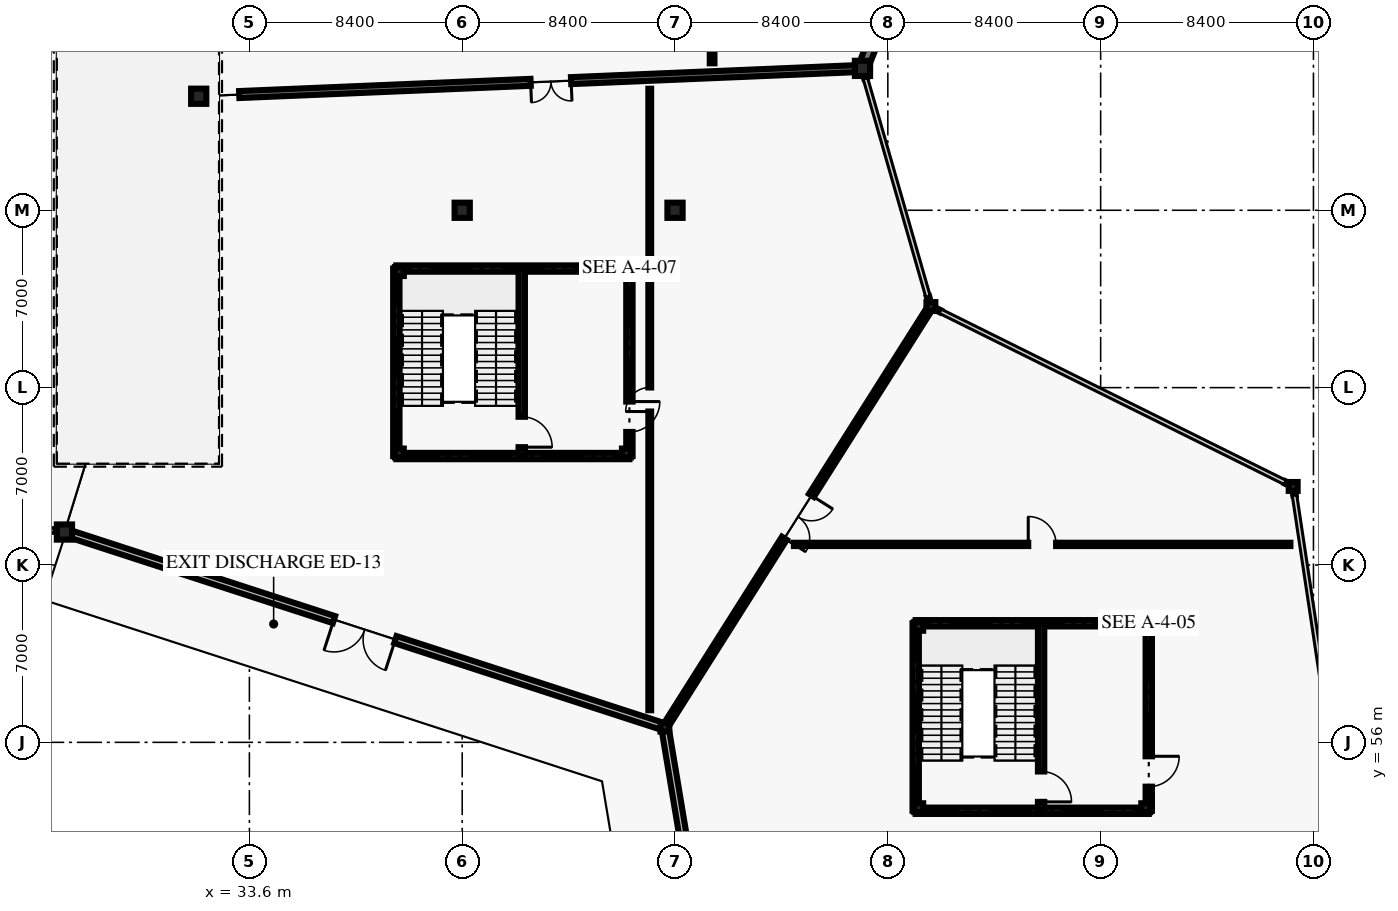
"""IFC4 building model, lengths in metres.
Left out: names, types, materials, properties, quantities, classifications, styles, units other than length and angle.
Written with IfcOpenShell. Run it as: python <this file> out.ifc"""

import sys

from ifc_helpers import new_model, si_unit, direction, frame, frame_2d, origin, origin_2d, place, context, subcontext, project, spatial, rectangle, i_section, extrude, element, fill, save


model = new_model("IFC4")
c1 = context("Model", 3, precision=1e-05, world=origin(), true_north=direction((0.0, 1.0)))
c2 = subcontext(c1, "Body", "Model", "MODEL_VIEW")
j1 = project(units=[si_unit("LENGTHUNIT", "METRE"), si_unit("PLANEANGLEUNIT", "RADIAN")], contexts=[c1])
p1 = place(None, origin())
s1 = spatial("IfcSite", under=j1, at=p1, CompositionType="ELEMENT")
p2 = place(p1, origin())
s2 = spatial("IfcBuilding", under=s1, at=p2, CompositionType="ELEMENT")
p3 = place(p2, origin())
s3 = spatial("IfcBuildingStorey", under=s2, at=p3, CompositionType="ELEMENT", Elevation=0.0)
for number, where, z_axis, x_axis in (
    (1, (26.3, 64.3, 0.0), (0.0, 0.0, 1.0), (1.0, 0.0, 0.0)),
    (2, (31.6, 81.5, 0.0), (0.0, 0.0, 1.0), (1.0, 0.0, 0.0)),
):
    element("IfcColumn", number, at=place(p3, frame(where, z_axis=z_axis, x_axis=x_axis)), inside=s3, PredefinedType="COLUMN", context=c2, shape_type="SweptSolid", body=[
        extrude(rectangle(XDim=0.6, YDim=0.6, at=origin_2d()), origin(), (0.0, 0.0, 1.0), 5.4),
    ])
p4 = place(p3, frame((50.0, 56.6, 0.0), z_axis=(0.0, 0.0, 1.0), x_axis=(1.0, 0.0, 0.0)))
e3 = element("IfcColumn", 3, at=p4, inside=s3, PredefinedType="COLUMN", context=c2, shape_type="SweptSolid", body=[
    extrude(i_section(OverallWidth=0.35, OverallDepth=0.35, WebThickness=0.02, FlangeThickness=0.028, at=origin_2d()), origin(), (0.0, 0.0, 1.0), 5.4),
])
p5 = place(p3, frame((57.8, 82.6, 0.0), z_axis=(0.0, 0.0, 1.0), x_axis=(1.0, 0.0, 0.0)))
e4 = element("IfcColumn", 4, at=p5, inside=s3, PredefinedType="COLUMN", context=c2, shape_type="SweptSolid", body=[
    extrude(rectangle(XDim=0.6, YDim=0.6, at=origin_2d()), origin(), (0.0, 0.0, 1.0), 5.4),
])
for number, where, z_axis, x_axis in (
    (5, (60.5, 73.2, 0.0), (0.0, 0.0, 1.0), (1.0, 0.0, 0.0)),
    (6, (74.8, 66.1, 0.0), (0.0, 0.0, 1.0), (1.0, 0.0, 0.0)),
):
    element("IfcColumn", number, at=place(p3, frame(where, z_axis=z_axis, x_axis=x_axis)), inside=s3, PredefinedType="COLUMN", context=c2, shape_type="SweptSolid", body=[
        extrude(i_section(OverallWidth=0.35, OverallDepth=0.35, WebThickness=0.02, FlangeThickness=0.028, at=origin_2d()), origin(), (0.0, 0.0, 1.0), 5.4),
    ])
for number, where, z_axis, x_axis in (
    (7, (42.0, 77.0, 0.0), (0.0, 0.0, 1.0), (1.0, 0.0, 0.0)),
    (8, (50.4, 77.0, 0.0), (0.0, 0.0, 1.0), (1.0, 0.0, 0.0)),
):
    element("IfcColumn", number, at=place(p3, frame(where, z_axis=z_axis, x_axis=x_axis)), inside=s3, PredefinedType="COLUMN", context=c2, shape_type="SweptSolid", body=[
        extrude(rectangle(XDim=0.6, YDim=0.6, at=origin_2d()), origin(), (0.0, 0.0, 1.0), 5.4),
    ])
for number, where, z_axis, x_axis in (
    (9, (60.02, 53.42, 0.0), (0.0, 0.0, 1.0), (1.0, 0.0, 0.0)),
    (10, (68.98, 53.42, 0.0), (0.0, 0.0, 1.0), (1.0, 0.0, 0.0)),
    (11, (68.98, 60.58, 0.0), (0.0, 0.0, 1.0), (1.0, 0.0, 0.0)),
    (12, (60.02, 60.58, 0.0), (0.0, 0.0, 1.0), (1.0, 0.0, 0.0)),
    (13, (39.52, 67.42, 0.0), (0.0, 0.0, 1.0), (1.0, 0.0, 0.0)),
    (14, (48.48, 67.42, 0.0), (0.0, 0.0, 1.0), (1.0, 0.0, 0.0)),
    (15, (48.48, 74.58, 0.0), (0.0, 0.0, 1.0), (1.0, 0.0, 0.0)),
    (16, (39.52, 74.58, 0.0), (0.0, 0.0, 1.0), (1.0, 0.0, 0.0)),
):
    element("IfcColumn", number, at=place(p3, frame(where, z_axis=z_axis, x_axis=x_axis)), inside=s3, PredefinedType="COLUMN", context=c2, shape_type="SweptSolid", body=[
        extrude(i_section(OverallWidth=0.35, OverallDepth=0.35, WebThickness=0.02, FlangeThickness=0.028, at=origin_2d()), origin(), (0.0, 0.0, 1.0), 5.4),
    ])
p6 = place(p3, frame((51.99, 44.659, 0.0), z_axis=(0.0, 0.0, 1.0), x_axis=(-0.16436940764, 0.986398853321, 0.0)))
e17 = element("IfcWall", 17, at=p6, inside=s3, PredefinedType="SOLIDWALL", context=c2, shape_type="SweptSolid", body=[
    extrude(rectangle(XDim=12.046, YDim=0.29, at=frame_2d((6.023, 0.0))), origin(), (0.0, 0.0, 1.0), 4.22),
])
p7 = place(p6, frame((4.748, 0.0, 0.0)))
e18 = element("IfcOpeningElement", 18, at=p7, cuts=e17, PredefinedType="OPENING", context=c2, shape_type="SweptSolid", body=[
    extrude(rectangle(XDim=2.55, YDim=2.5, at=frame_2d((1.275, 1.25))), frame((0.0, 0.155, 0.0), z_axis=(0.0, -1.0, 0.0), x_axis=(1.0, 0.0, 0.0)), (0.0, 0.0, 1.0), 0.31),
])
p8 = place(p3, frame((74.806, 66.058, 0.0), z_axis=(0.0, 0.0, 1.0), x_axis=(0.14996991646, -0.988690560366, 0.0)))
e19 = element("IfcWall", 19, at=p8, inside=s3, PredefinedType="SOLIDWALL", context=c2, shape_type="SweptSolid", body=[
    extrude(rectangle(XDim=0.308, YDim=0.095, at=frame_2d((0.154, 0.0))), origin(), (0.0, 0.0, 1.0), 4.22),
])
for number, where, z_axis, x_axis in (
    (20, (60.592, 73.154, 0.0), (0.0, 0.0, 1.0), (0.895, -0.446, 0.0)),
    (21, (74.487, 66.256, 0.0), (0.0, 0.0, 1.0), (0.895, -0.447, 0.0)),
):
    element("IfcWall", number, at=place(p3, frame(where, z_axis=z_axis, x_axis=x_axis)), inside=s3, PredefinedType="SOLIDWALL", context=c2, shape_type="SweptSolid", body=[
        extrude(rectangle(XDim=0.307, YDim=0.095, at=frame_2d((0.154, 0.0))), origin(), (0.0, 0.0, 1.0), 4.22),
    ])
for number, where, z_axis, x_axis in (
    (22, (57.829, 82.502, 0.0), (0.0, 0.0, 1.0), (0.276, -0.961, 0.0)),
    (23, (60.386, 73.594, 0.0), (0.0, 0.0, 1.0), (0.276, -0.961, 0.0)),
):
    element("IfcWall", number, at=place(p3, frame(where, z_axis=z_axis, x_axis=x_axis)), inside=s3, PredefinedType="SOLIDWALL", context=c2, shape_type="SweptSolid", body=[
        extrude(rectangle(XDim=0.308, YDim=0.095, at=frame_2d((0.154, 0.0))), origin(), (0.0, 0.0, 1.0), 4.22),
    ])
p9 = place(p3, frame((49.943, 56.619, 0.0), z_axis=(0.0, 0.0, 1.0), x_axis=(-0.951074357174, 0.308962080402, 0.0)))
e24 = element("IfcWall", 24, at=p9, inside=s3, PredefinedType="SOLIDWALL", context=c2, shape_type="SweptSolid", body=[
    extrude(rectangle(XDim=24.8, YDim=0.29, at=frame_2d((12.4, 0.0))), origin(), (0.0, 0.0, 1.0), 4.22),
])
p10 = place(p9, frame((11.124, 0.0, 0.0)))
e25 = element("IfcOpeningElement", 25, at=p10, cuts=e24, PredefinedType="OPENING", context=c2, shape_type="SweptSolid", body=[
    extrude(rectangle(XDim=2.55, YDim=2.5, at=frame_2d((1.275, 1.25))), frame((0.0, 0.155, 0.0), z_axis=(0.0, -1.0, 0.0), x_axis=(1.0, 0.0, 0.0)), (0.0, 0.0, 1.0), 0.31),
])
p11 = place(p3, frame((62.4, 94.1, 0.0), z_axis=(0.0, 0.0, 1.0), x_axis=(-0.371407751599, -0.928469860605, 0.0)))
e26 = element("IfcWall", 26, at=p11, inside=s3, PredefinedType="SOLIDWALL", context=c2, shape_type="SweptSolid", body=[
    extrude(rectangle(XDim=12.326, YDim=0.4, at=frame_2d((6.163, 0.0))), origin(), (0.0, 0.0, 1.0), 4.22),
])
p12 = place(p3, frame((26.199, 64.314, 0.0), z_axis=(0.0, 0.0, 1.0), x_axis=(-0.991074779294, 0.133307096014, 0.0)))
e27 = element("IfcWall", 27, at=p12, inside=s3, PredefinedType="SOLIDWALL", context=c2, shape_type="SweptSolid", body=[
    extrude(rectangle(XDim=0.308, YDim=0.095, at=frame_2d((0.154, 0.0))), origin(), (0.0, 0.0, 1.0), 4.22),
])
p13 = place(p3, frame((60.5, 73.2, 0.0), z_axis=(0.0, 0.0, 1.0), x_axis=(-0.534570878454, -0.845123645338, 0.0)))
e28 = element("IfcWall", 28, at=p13, inside=s3, PredefinedType="SOLIDWALL", context=c2, shape_type="SweptSolid", body=[
    extrude(rectangle(XDim=19.642, YDim=0.225, at=frame_2d((9.821, 0.0))), origin(), (0.0, 0.0, 1.0), 4.62),
])
p14 = place(p13, frame((8.821, 0.0, 0.0)))
e29 = element("IfcOpeningElement", 29, at=p14, cuts=e28, PredefinedType="OPENING", context=c2, shape_type="SweptSolid", body=[
    extrude(rectangle(XDim=2.0, YDim=2.5, at=frame_2d((1.0, 1.25))), frame((0.0, 0.123, 0.0), z_axis=(0.0, -1.0, 0.0), x_axis=(1.0, 0.0, 0.0)), (0.0, 0.0, 1.0), 0.245),
])
p15 = place(p3, frame((57.8, 82.6, 0.0), z_axis=(0.0, 0.0, 1.0), x_axis=(-0.999119166836, -0.041962965345, 0.0)))
e30 = element("IfcWall", 30, at=p15, inside=s3, PredefinedType="SOLIDWALL", context=c2, shape_type="SweptSolid", body=[
    extrude(rectangle(XDim=24.622, YDim=0.275, at=frame_2d((12.311, 0.0))), origin(), (0.0, 0.0, 1.0), 4.62),
])
p16 = place(p15, frame((11.511, 0.0, 0.0)))
e31 = element("IfcOpeningElement", 31, at=p16, cuts=e30, PredefinedType="OPENING", context=c2, shape_type="SweptSolid", body=[
    extrude(rectangle(XDim=1.6, YDim=2.45, at=frame_2d((0.8, 1.225))), frame((0.0, 0.147, 0.0), z_axis=(0.0, -1.0, 0.0), x_axis=(1.0, 0.0, 0.0)), (0.0, 0.0, 1.0), 0.295),
])
p17 = place(p3, frame((55.095, 63.813, 0.0), z_axis=(0.0, 0.0, 1.0), x_axis=(1.0, 0.0, 0.0)))
e32 = element("IfcWall", 32, at=p17, inside=s3, PredefinedType="PARTITIONING", context=c2, shape_type="SweptSolid", body=[
    extrude(rectangle(XDim=19.595, YDim=0.13, at=frame_2d((9.797, 0.0))), origin(), (0.0, 0.0, 1.0), 3.92),
])
p18 = place(p17, frame((9.247, 0.0, 0.0)))
e33 = element("IfcOpeningElement", 33, at=p18, cuts=e32, PredefinedType="OPENING", context=c2, shape_type="SweptSolid", body=[
    extrude(rectangle(XDim=1.1, YDim=2.2, at=frame_2d((0.55, 1.1))), frame((0.0, 0.075, 0.0), z_axis=(0.0, -1.0, 0.0), x_axis=(1.0, 0.0, 0.0)), (0.0, 0.0, 1.0), 0.15),
])
p19 = place(p3, frame((49.403, 57.267, 0.0), z_axis=(0.0, 0.0, 1.0), x_axis=(0.0, 1.0, 0.0)))
e34 = element("IfcWall", 34, at=p19, inside=s3, PredefinedType="PARTITIONING", context=c2, shape_type="SweptSolid", body=[
    extrude(rectangle(XDim=24.53, YDim=0.11, at=frame_2d((12.265, 0.0))), origin(), (0.0, 0.0, 1.0), 3.92),
])
p20 = place(p19, frame((11.79, 0.0, 0.0)))
e35 = element("IfcOpeningElement", 35, at=p20, cuts=e34, PredefinedType="OPENING", context=c2, shape_type="SweptSolid", body=[
    extrude(rectangle(XDim=0.95, YDim=2.15, at=frame_2d((0.475, 1.075))), frame((0.0, 0.065, 0.0), z_axis=(0.0, -1.0, 0.0), x_axis=(1.0, 0.0, 0.0)), (0.0, 0.0, 1.0), 0.13),
])
p21 = place(p3, frame((51.864, 82.801, 0.0), z_axis=(0.0, 0.0, 1.0), x_axis=(0.0, 1.0, 0.0)))
e36 = element("IfcWall", 36, at=p21, inside=s3, PredefinedType="PARTITIONING", context=c2, shape_type="SweptSolid", body=[
    extrude(rectangle(XDim=19.121, YDim=0.185, at=frame_2d((9.561, 0.0))), origin(), (0.0, 0.0, 1.0), 3.92),
])
p22 = place(p21, frame((9.1, 0.0, 0.0)))
e37 = element("IfcOpeningElement", 37, at=p22, cuts=e36, PredefinedType="OPENING", context=c2, shape_type="SweptSolid", body=[
    extrude(rectangle(XDim=0.92, YDim=2.1, at=frame_2d((0.46, 1.05))), frame((0.0, 0.103, 0.0), z_axis=(0.0, -1.0, 0.0), x_axis=(1.0, 0.0, 0.0)), (0.0, 0.0, 1.0), 0.205),
])
p23 = place(p3, frame((59.9, 53.3, 0.0), z_axis=(0.0, 0.0, 1.0), x_axis=(0.0, 1.0, 0.0)))
e38 = element("IfcWall", 38, at=p23, inside=s3, PredefinedType="SHEAR", context=c2, shape_type="SweptSolid", body=[
    extrude(rectangle(XDim=7.4, YDim=0.25, at=frame_2d((3.7, 0.0))), origin(), (0.0, 0.0, 1.0), 5.16),
])
for number, where, z_axis, x_axis in (
    (39, (59.9, 60.7, 0.0), (0.0, 0.0, 1.0), (1.0, 0.0, 0.0)),
    (40, (69.1, 53.3, 0.0), (0.0, 0.0, 1.0), (-1.0, 0.0, 0.0)),
):
    element("IfcWall", number, at=place(p3, frame(where, z_axis=z_axis, x_axis=x_axis)), inside=s3, PredefinedType="SHEAR", context=c2, shape_type="SweptSolid", body=[
        extrude(rectangle(XDim=9.2, YDim=0.25, at=frame_2d((4.6, 0.0))), origin(), (0.0, 0.0, 1.0), 5.16),
    ])
p24 = place(p3, frame((69.1, 60.7, 0.0), z_axis=(0.0, 0.0, 1.0), x_axis=(0.0, -1.0, 0.0)))
e41 = element("IfcWall", 41, at=p24, inside=s3, PredefinedType="SHEAR", context=c2, shape_type="SweptSolid", body=[
    extrude(rectangle(XDim=7.4, YDim=0.25, at=frame_2d((3.7, 0.0))), origin(), (0.0, 0.0, 1.0), 5.16),
])
p25 = place(p24, frame((5.25, 0.0, 0.0)))
e42 = element("IfcOpeningElement", 42, at=p25, cuts=e41, PredefinedType="OPENING", context=c2, shape_type="SweptSolid", body=[
    extrude(rectangle(XDim=1.2, YDim=2.2, at=frame_2d((0.6, 1.1))), frame((0.0, 0.135, 0.0), z_axis=(0.0, -1.0, 0.0), x_axis=(1.0, 0.0, 0.0)), (0.0, 0.0, 1.0), 0.27),
])
p26 = place(p3, frame((64.85, 60.7, 0.0), z_axis=(0.0, 0.0, 1.0), x_axis=(0.0, -1.0, 0.0)))
e43 = element("IfcWall", 43, at=p26, inside=s3, PredefinedType="SHEAR", context=c2, shape_type="SweptSolid", body=[
    extrude(rectangle(XDim=7.4, YDim=0.25, at=frame_2d((3.7, 0.0))), origin(), (0.0, 0.0, 1.0), 5.16),
])
p27 = place(p26, frame((5.85, 0.0, 0.0)))
e44 = element("IfcOpeningElement", 44, at=p27, cuts=e43, PredefinedType="OPENING", context=c2, shape_type="SweptSolid", body=[
    extrude(rectangle(XDim=1.2, YDim=2.2, at=frame_2d((0.6, 1.1))), frame((0.0, 0.135, 0.0), z_axis=(0.0, -1.0, 0.0), x_axis=(1.0, 0.0, 0.0)), (0.0, 0.0, 1.0), 0.27),
])
p28 = place(p3, frame((39.4, 67.3, 0.0), z_axis=(0.0, 0.0, 1.0), x_axis=(0.0, 1.0, 0.0)))
e45 = element("IfcWall", 45, at=p28, inside=s3, PredefinedType="SHEAR", context=c2, shape_type="SweptSolid", body=[
    extrude(rectangle(XDim=7.4, YDim=0.25, at=frame_2d((3.7, 0.0))), origin(), (0.0, 0.0, 1.0), 5.16),
])
for number, where, z_axis, x_axis in (
    (46, (39.4, 74.7, 0.0), (0.0, 0.0, 1.0), (1.0, 0.0, 0.0)),
    (47, (48.6, 67.3, 0.0), (0.0, 0.0, 1.0), (-1.0, 0.0, 0.0)),
):
    element("IfcWall", number, at=place(p3, frame(where, z_axis=z_axis, x_axis=x_axis)), inside=s3, PredefinedType="SHEAR", context=c2, shape_type="SweptSolid", body=[
        extrude(rectangle(XDim=9.2, YDim=0.25, at=frame_2d((4.6, 0.0))), origin(), (0.0, 0.0, 1.0), 5.16),
    ])
p29 = place(p3, frame((48.6, 74.7, 0.0), z_axis=(0.0, 0.0, 1.0), x_axis=(0.0, -1.0, 0.0)))
e48 = element("IfcWall", 48, at=p29, inside=s3, PredefinedType="SHEAR", context=c2, shape_type="SweptSolid", body=[
    extrude(rectangle(XDim=7.4, YDim=0.25, at=frame_2d((3.7, 0.0))), origin(), (0.0, 0.0, 1.0), 5.16),
])
p30 = place(p29, frame((5.25, 0.0, 0.0)))
e49 = element("IfcOpeningElement", 49, at=p30, cuts=e48, PredefinedType="OPENING", context=c2, shape_type="SweptSolid", body=[
    extrude(rectangle(XDim=1.2, YDim=2.2, at=frame_2d((0.6, 1.1))), frame((0.0, 0.135, 0.0), z_axis=(0.0, -1.0, 0.0), x_axis=(1.0, 0.0, 0.0)), (0.0, 0.0, 1.0), 0.27),
])
p31 = place(p3, frame((44.35, 74.7, 0.0), z_axis=(0.0, 0.0, 1.0), x_axis=(0.0, -1.0, 0.0)))
e50 = element("IfcWall", 50, at=p31, inside=s3, PredefinedType="SHEAR", context=c2, shape_type="SweptSolid", body=[
    extrude(rectangle(XDim=7.4, YDim=0.25, at=frame_2d((3.7, 0.0))), origin(), (0.0, 0.0, 1.0), 5.16),
])
p32 = place(p31, frame((5.85, 0.0, 0.0)))
e51 = element("IfcOpeningElement", 51, at=p32, cuts=e50, PredefinedType="OPENING", context=c2, shape_type="SweptSolid", body=[
    extrude(rectangle(XDim=1.2, YDim=2.2, at=frame_2d((0.6, 1.1))), frame((0.0, 0.135, 0.0), z_axis=(0.0, -1.0, 0.0), x_axis=(1.0, 0.0, 0.0)), (0.0, 0.0, 1.0), 0.27),
])
p33 = place(p10, origin())
e52 = element("IfcDoor", 52, at=p33, inside=s3, OperationType="DOUBLE_DOOR_SINGLE_SWING", PredefinedType="DOOR", context=c2, shape_type="SweptSolid", body=[
    extrude(rectangle(XDim=2.55, YDim=2.5, at=frame_2d((1.275, 1.25))), frame((0.0, 0.025, 0.0), z_axis=(0.0, -1.0, 0.0), x_axis=(1.0, 0.0, 0.0)), (0.0, 0.0, 1.0), 0.05),
])
fill(e25, e52)
p34 = place(p14, origin())
e53 = element("IfcDoor", 53, at=p34, inside=s3, OperationType="DOUBLE_DOOR_SINGLE_SWING", PredefinedType="DOOR", context=c2, shape_type="SweptSolid", body=[
    extrude(rectangle(XDim=2.0, YDim=2.5, at=frame_2d((1.0, 1.25))), frame((0.0, 0.025, 0.0), z_axis=(0.0, -1.0, 0.0), x_axis=(1.0, 0.0, 0.0)), (0.0, 0.0, 1.0), 0.05),
])
fill(e29, e53)
p35 = place(p16, origin())
e54 = element("IfcDoor", 54, at=p35, inside=s3, OperationType="DOUBLE_DOOR_SINGLE_SWING", PredefinedType="DOOR", context=c2, shape_type="SweptSolid", body=[
    extrude(rectangle(XDim=1.6, YDim=2.45, at=frame_2d((0.8, 1.225))), frame((0.0, 0.025, 0.0), z_axis=(0.0, -1.0, 0.0), x_axis=(1.0, 0.0, 0.0)), (0.0, 0.0, 1.0), 0.05),
])
fill(e31, e54)
p36 = place(p18, origin())
e55 = element("IfcDoor", 55, at=p36, inside=s3, OperationType="SINGLE_SWING_LEFT", PredefinedType="DOOR", context=c2, shape_type="SweptSolid", body=[
    extrude(rectangle(XDim=1.1, YDim=2.2, at=frame_2d((0.55, 1.1))), frame((0.0, 0.025, 0.0), z_axis=(0.0, -1.0, 0.0), x_axis=(1.0, 0.0, 0.0)), (0.0, 0.0, 1.0), 0.05),
])
fill(e33, e55)
p37 = place(p20, origin())
e56 = element("IfcDoor", 56, at=p37, inside=s3, OperationType="SINGLE_SWING_LEFT", PredefinedType="DOOR", context=c2, shape_type="SweptSolid", body=[
    extrude(rectangle(XDim=0.95, YDim=2.15, at=frame_2d((0.475, 1.075))), frame((0.0, 0.025, 0.0), z_axis=(0.0, -1.0, 0.0), x_axis=(1.0, 0.0, 0.0)), (0.0, 0.0, 1.0), 0.05),
])
fill(e35, e56)
p38 = place(p25, origin())
e57 = element("IfcDoor", 57, at=p38, inside=s3, OperationType="SINGLE_SWING_LEFT", PredefinedType="DOOR", context=c2, shape_type="SweptSolid", body=[
    extrude(rectangle(XDim=1.2, YDim=2.2, at=frame_2d((0.6, 1.1))), frame((0.0, 0.025, 0.0), z_axis=(0.0, -1.0, 0.0), x_axis=(1.0, 0.0, 0.0)), (0.0, 0.0, 1.0), 0.05),
])
fill(e42, e57)
p39 = place(p27, origin())
e58 = element("IfcDoor", 58, at=p39, inside=s3, OperationType="SINGLE_SWING_RIGHT", PredefinedType="DOOR", context=c2, shape_type="SweptSolid", body=[
    extrude(rectangle(XDim=1.2, YDim=2.2, at=frame_2d((0.6, 1.1))), frame((0.0, 0.025, 0.0), z_axis=(0.0, -1.0, 0.0), x_axis=(1.0, 0.0, 0.0)), (0.0, 0.0, 1.0), 0.05),
])
fill(e44, e58)
p40 = place(p30, origin())
e59 = element("IfcDoor", 59, at=p40, inside=s3, OperationType="SINGLE_SWING_LEFT", PredefinedType="DOOR", context=c2, shape_type="SweptSolid", body=[
    extrude(rectangle(XDim=1.2, YDim=2.2, at=frame_2d((0.6, 1.1))), frame((0.0, 0.025, 0.0), z_axis=(0.0, -1.0, 0.0), x_axis=(1.0, 0.0, 0.0)), (0.0, 0.0, 1.0), 0.05),
])
fill(e49, e59)
p41 = place(p32, origin())
e60 = element("IfcDoor", 60, at=p41, inside=s3, OperationType="SINGLE_SWING_RIGHT", PredefinedType="DOOR", context=c2, shape_type="SweptSolid", body=[
    extrude(rectangle(XDim=1.2, YDim=2.2, at=frame_2d((0.6, 1.1))), frame((0.0, 0.025, 0.0), z_axis=(0.0, -1.0, 0.0), x_axis=(1.0, 0.0, 0.0)), (0.0, 0.0, 1.0), 0.05),
])
fill(e51, e60)
save(model, sys.argv[1])
